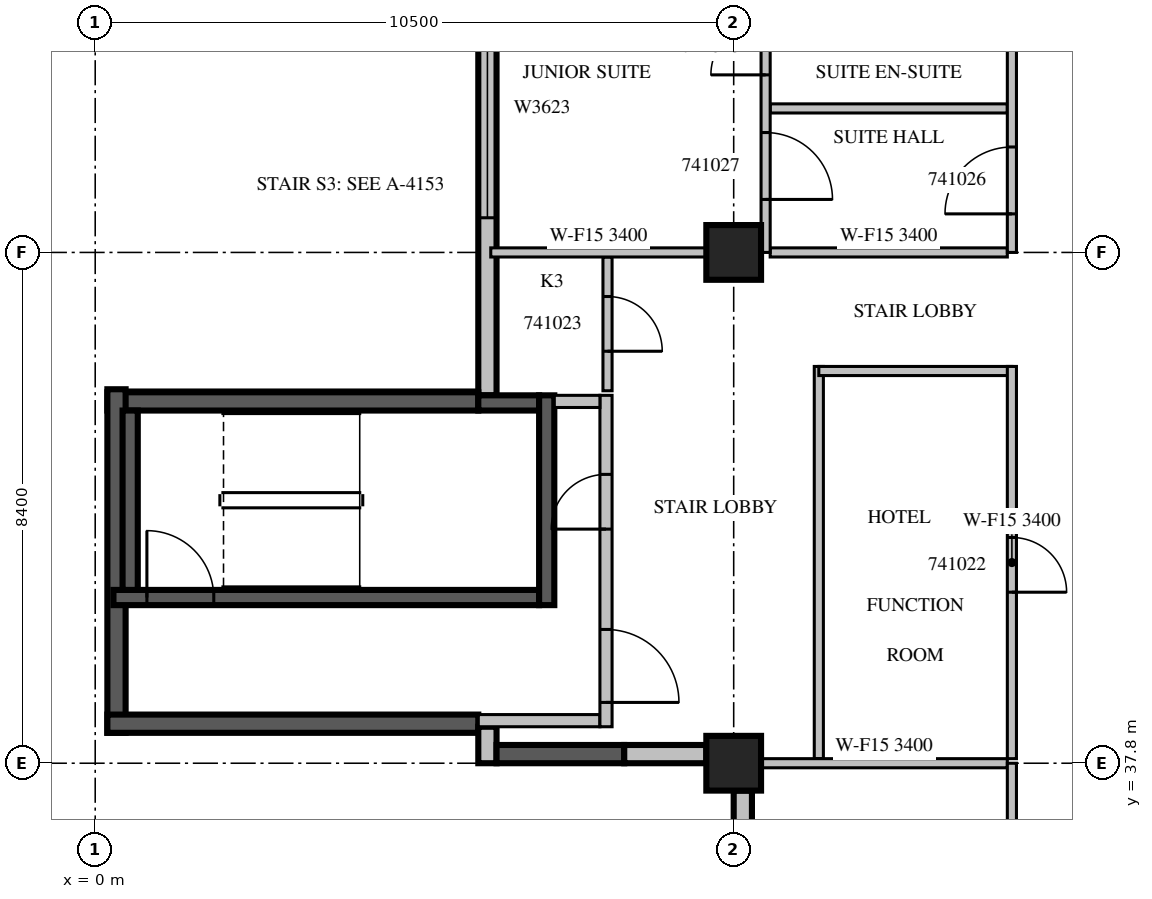
"""IFC4 building model, lengths in metres.
Left out: names, types, materials, properties, quantities, classifications, styles, units other than length and angle.
Written with IfcOpenShell. Run it as: python <this file> out.ifc"""

import sys

from ifc_helpers import new_model, si_unit, direction, frame, frame_2d, origin, origin_2d, place, context, subcontext, project, spatial, rectangle, extrude, source, transform, mapped, element, fill, save


model = new_model("IFC4")
c1 = context("Model", 3, precision=1e-05, world=origin(), true_north=direction((0.0, 1.0)))
c2 = subcontext(c1, "Body", "Model", "MODEL_VIEW")
j1 = project(units=[si_unit("LENGTHUNIT", "METRE"), si_unit("PLANEANGLEUNIT", "RADIAN")], contexts=[c1])
p1 = place(None, origin())
s1 = spatial("IfcSite", under=j1, at=p1, CompositionType="ELEMENT")
p2 = place(p1, origin())
s2 = spatial("IfcBuilding", under=s1, at=p2, CompositionType="ELEMENT")
p3 = place(p2, frame((0.0, 0.0, 189.2)))
s3 = spatial("IfcBuildingStorey", under=s2, at=p3, CompositionType="ELEMENT", Elevation=189.2)
m1 = source(origin(), c2, "Body", "SweptSolid", [
    extrude(rectangle(XDim=0.9, YDim=0.9, at=origin_2d()), origin(), (0.0, 0.0, 1.0), 3.8),
])
for number, where, z_axis, x_axis in (
    (1, (10.5, 37.8, 0.0), (0.0, 0.0, 1.0), (1.0, 0.0, 0.0)),
    (2, (10.5, 46.2, 0.0), (0.0, 0.0, 1.0), (1.0, 0.0, 0.0)),
):
    element("IfcColumn", number, at=place(p3, frame(where, z_axis=z_axis, x_axis=x_axis)), inside=s3, PredefinedType="COLUMN", context=c2, shape_type="MappedRepresentation", body=[
        mapped(m1, transform((0.0, 0.0, 0.0), scale=1.0)),
    ])
m2 = source(origin(), c2, "Body", "SweptSolid", [
    extrude(rectangle(XDim=9.91, YDim=0.3, at=frame_2d((4.955, 0.0))), origin(), (0.0, 0.0, 1.0), 3.4),
])
p4 = place(p3, frame((6.45, 53.76, 0.0), z_axis=(0.0, 0.0, 1.0), x_axis=(0.0, -1.0, 0.0)))
e3 = element("IfcWall", 3, at=p4, inside=s3, PredefinedType="STANDARD", context=c2, shape_type="MappedRepresentation", body=[
    mapped(m2, transform((0.0, 0.0, 0.0), scale=1.0)),
])
m3 = source(origin(), c2, "Body", "SweptSolid", [
    extrude(rectangle(XDim=3.6, YDim=2.3, at=frame_2d((1.8, 1.15))), frame((0.0, 0.16, 0.0), z_axis=(0.0, -1.0, 0.0), x_axis=(1.0, 0.0, 0.0)), (0.0, 0.0, 1.0), 0.32),
])
p5 = place(p4, frame((3.39, 0.0, 0.6)))
e4 = element("IfcOpeningElement", 4, at=p5, cuts=e3, PredefinedType="OPENING", context=c2, shape_type="MappedRepresentation", body=[
    mapped(m3, transform((0.0, 0.0, 0.0), scale=1.0)),
])
m4 = source(origin(), c2, "Body", "SweptSolid", [
    extrude(rectangle(XDim=2.4, YDim=2.3, at=frame_2d((1.2, 1.15))), frame((0.0, 0.16, 0.0), z_axis=(0.0, -1.0, 0.0), x_axis=(1.0, 0.0, 0.0)), (0.0, 0.0, 1.0), 0.32),
])
p6 = place(p4, frame((0.495, 0.0, 0.6)))
e5 = element("IfcOpeningElement", 5, at=p6, cuts=e3, PredefinedType="OPENING", context=c2, shape_type="MappedRepresentation", body=[
    mapped(m4, transform((0.0, 0.0, 0.0), scale=1.0)),
])
m5 = source(origin(), c2, "Body", "SweptSolid", [
    extrude(rectangle(XDim=6.1, YDim=0.3, at=frame_2d((3.05, 0.0))), origin(), (0.0, 0.0, 1.0), 3.4),
])
p7 = place(p3, frame((6.3, 43.75, 0.0), z_axis=(0.0, 0.0, 1.0), x_axis=(-1.0, 0.0, 0.0)))
e6 = element("IfcWall", 6, at=p7, inside=s3, PredefinedType="SOLIDWALL", context=c2, shape_type="MappedRepresentation", body=[
    mapped(m5, transform((0.0, 0.0, 0.0), scale=1.0)),
])
m6 = source(origin(), c2, "Body", "SweptSolid", [
    extrude(rectangle(XDim=5.65, YDim=0.3, at=frame_2d((2.825, 0.0))), origin(), (0.0, 0.0, 1.0), 3.4),
])
p8 = place(p3, frame((0.35, 43.95, 0.0), z_axis=(0.0, 0.0, 1.0), x_axis=(0.0, -1.0, 0.0)))
e7 = element("IfcWall", 7, at=p8, inside=s3, PredefinedType="SOLIDWALL", context=c2, shape_type="MappedRepresentation", body=[
    mapped(m6, transform((0.0, 0.0, 0.0), scale=1.0)),
])
p9 = place(p3, frame((0.2, 38.45, 0.0), z_axis=(0.0, 0.0, 1.0), x_axis=(1.0, 0.0, 0.0)))
e8 = element("IfcWall", 8, at=p9, inside=s3, PredefinedType="SOLIDWALL", context=c2, shape_type="MappedRepresentation", body=[
    mapped(m5, transform((0.0, 0.0, 0.0), scale=1.0)),
])
m7 = source(origin(), c2, "Body", "SweptSolid", [
    extrude(rectangle(XDim=0.6, YDim=0.3, at=frame_2d((0.3, 0.0))), origin(), (0.0, 0.0, 1.0), 3.4),
])
p10 = place(p3, frame((6.45, 38.4, 0.0), z_axis=(0.0, 0.0, 1.0), x_axis=(0.0, -1.0, 0.0)))
e9 = element("IfcWall", 9, at=p10, inside=s3, PredefinedType="STANDARD", context=c2, shape_type="MappedRepresentation", body=[
    mapped(m7, transform((0.0, 0.0, 0.0), scale=1.0)),
])
m8 = source(origin(), c2, "Body", "SweptSolid", [
    extrude(rectangle(XDim=2.1, YDim=0.3, at=frame_2d((1.05, 0.0))), origin(), (0.0, 0.0, 1.0), 3.4),
])
p11 = place(p3, frame((6.6, 37.95, 0.0), z_axis=(0.0, 0.0, 1.0), x_axis=(1.0, 0.0, 0.0)))
e10 = element("IfcWall", 10, at=p11, inside=s3, PredefinedType="SOLIDWALL", context=c2, shape_type="MappedRepresentation", body=[
    mapped(m8, transform((0.0, 0.0, 0.0), scale=1.0)),
])
m9 = source(origin(), c2, "Body", "SweptSolid", [
    extrude(rectangle(XDim=1.35, YDim=0.3, at=frame_2d((0.675, 0.0))), origin(), (0.0, 0.0, 1.0), 3.4),
])
p12 = place(p3, frame((8.7, 37.95, 0.0), z_axis=(0.0, 0.0, 1.0), x_axis=(1.0, 0.0, 0.0)))
e11 = element("IfcWall", 11, at=p12, inside=s3, PredefinedType="STANDARD", context=c2, shape_type="MappedRepresentation", body=[
    mapped(m9, transform((0.0, 0.0, 0.0), scale=1.0)),
])
m10 = source(origin(), c2, "Body", "SweptSolid", [
    extrude(rectangle(XDim=7.5, YDim=0.3, at=frame_2d((3.75, 0.0))), origin(), (0.0, 0.0, 1.0), 3.4),
])
p13 = place(p3, frame((10.65, 37.35, 0.0), z_axis=(0.0, 0.0, 1.0), x_axis=(0.0, -1.0, 0.0)))
e12 = element("IfcWall", 12, at=p13, inside=s3, PredefinedType="STANDARD", context=c2, shape_type="MappedRepresentation", body=[
    mapped(m10, transform((0.0, 0.0, 0.0), scale=1.0)),
])
m11 = source(origin(), c2, "Body", "SweptSolid", [
    extrude(rectangle(XDim=1.8, YDim=2.3, at=frame_2d((0.9, 1.15))), frame((0.0, 0.16, 0.0), z_axis=(0.0, -1.0, 0.0), x_axis=(1.0, 0.0, 0.0)), (0.0, 0.0, 1.0), 0.32),
])
p14 = place(p13, frame((4.5, 0.0, 0.6)))
e13 = element("IfcOpeningElement", 13, at=p14, cuts=e12, PredefinedType="OPENING", context=c2, shape_type="MappedRepresentation", body=[
    mapped(m11, transform((0.0, 0.0, 0.0), scale=1.0)),
])
m12 = source(origin(), c2, "Body", "SweptSolid", [
    extrude(rectangle(XDim=1.2, YDim=2.3, at=frame_2d((0.6, 1.15))), frame((0.0, 0.16, 0.0), z_axis=(0.0, -1.0, 0.0), x_axis=(1.0, 0.0, 0.0)), (0.0, 0.0, 1.0), 0.32),
])
p15 = place(p13, frame((2.071, 0.0, 0.6)))
e14 = element("IfcOpeningElement", 14, at=p15, cuts=e12, PredefinedType="OPENING", context=c2, shape_type="MappedRepresentation", body=[
    mapped(m12, transform((0.0, 0.0, 0.0), scale=1.0)),
])
m13 = source(origin(), c2, "Body", "SweptSolid", [
    extrude(rectangle(XDim=7.0, YDim=0.25, at=frame_2d((3.5, 0.0))), origin(), (0.0, 0.0, 1.0), 3.4),
])
p16 = place(p3, frame((0.3, 40.525, 0.0), z_axis=(0.0, 0.0, 1.0), x_axis=(1.0, 0.0, 0.0)))
e15 = element("IfcWall", 15, at=p16, inside=s3, PredefinedType="SOLIDWALL", context=c2, shape_type="MappedRepresentation", body=[
    mapped(m13, transform((0.0, 0.0, 0.0), scale=1.0)),
])
m14 = source(origin(), c2, "Body", "SweptSolid", [
    extrude(rectangle(XDim=1.1, YDim=2.1, at=frame_2d((0.55, 1.05))), frame((0.0, 0.135, 0.0), z_axis=(0.0, -1.0, 0.0), x_axis=(1.0, 0.0, 0.0)), (0.0, 0.0, 1.0), 0.27),
])
p17 = place(p16, frame((0.55, 0.0, 0.0)))
e16 = element("IfcOpeningElement", 16, at=p17, cuts=e15, PredefinedType="OPENING", context=c2, shape_type="MappedRepresentation", body=[
    mapped(m14, transform((0.0, 0.0, 0.0), scale=1.0)),
])
m15 = source(origin(), c2, "Body", "SweptSolid", [
    extrude(rectangle(XDim=1.0, YDim=0.25, at=frame_2d((0.5, 0.0))), origin(), (0.0, 0.0, 1.0), 3.4),
])
p18 = place(p3, frame((6.3, 43.725, 0.0), z_axis=(0.0, 0.0, 1.0), x_axis=(1.0, 0.0, 0.0)))
e17 = element("IfcWall", 17, at=p18, inside=s3, PredefinedType="SOLIDWALL", context=c2, shape_type="MappedRepresentation", body=[
    mapped(m15, transform((0.0, 0.0, 0.0), scale=1.0)),
])
m16 = source(origin(), c2, "Body", "SweptSolid", [
    extrude(rectangle(XDim=3.45, YDim=0.25, at=frame_2d((1.725, 0.0))), origin(), (0.0, 0.0, 1.0), 3.4),
])
p19 = place(p3, frame((7.425, 40.4, 0.0), z_axis=(0.0, 0.0, 1.0), x_axis=(0.0, 1.0, 0.0)))
e18 = element("IfcWall", 18, at=p19, inside=s3, PredefinedType="SOLIDWALL", context=c2, shape_type="MappedRepresentation", body=[
    mapped(m16, transform((0.0, 0.0, 0.0), scale=1.0)),
])
m17 = source(origin(), c2, "Body", "SweptSolid", [
    extrude(rectangle(XDim=2.95, YDim=0.25, at=frame_2d((1.475, 0.0))), origin(), (0.0, 0.0, 1.0), 3.4),
])
p20 = place(p3, frame((0.575, 40.65, 0.0), z_axis=(0.0, 0.0, 1.0), x_axis=(0.0, 1.0, 0.0)))
e19 = element("IfcWall", 19, at=p20, inside=s3, PredefinedType="SOLIDWALL", context=c2, shape_type="MappedRepresentation", body=[
    mapped(m17, transform((0.0, 0.0, 0.0), scale=1.0)),
])
m18 = source(origin(), c2, "Body", "SweptSolid", [
    extrude(rectangle(XDim=2.0, YDim=0.2, at=frame_2d((1.0, 0.0))), origin(), (0.0, 0.0, 1.0), 3.4),
])
p21 = place(p3, frame((6.3, 38.5, 0.0), z_axis=(0.0, 0.0, 1.0), x_axis=(1.0, 0.0, 0.0)))
e20 = element("IfcWall", 20, at=p21, inside=s3, PredefinedType="PARTITIONING", context=c2, shape_type="MappedRepresentation", body=[
    mapped(m18, transform((0.0, 0.0, 0.0), scale=1.0)),
])
m19 = source(origin(), c2, "Body", "SweptSolid", [
    extrude(rectangle(XDim=5.45, YDim=0.2, at=frame_2d((2.725, 0.0))), origin(), (0.0, 0.0, 1.0), 3.4),
])
p22 = place(p3, frame((8.4, 38.4, 0.0), z_axis=(0.0, 0.0, 1.0), x_axis=(0.0, 1.0, 0.0)))
e21 = element("IfcWall", 21, at=p22, inside=s3, PredefinedType="PARTITIONING", context=c2, shape_type="MappedRepresentation", body=[
    mapped(m19, transform((0.0, 0.0, 0.0), scale=1.0)),
])
m20 = source(origin(), c2, "Body", "SweptSolid", [
    extrude(rectangle(XDim=1.2, YDim=2.1, at=frame_2d((0.6, 1.05))), frame((0.0, 0.11, 0.0), z_axis=(0.0, -1.0, 0.0), x_axis=(1.0, 0.0, 0.0)), (0.0, 0.0, 1.0), 0.22),
])
p23 = place(p22, frame((0.4, 0.0, 0.0)))
e22 = element("IfcOpeningElement", 22, at=p23, cuts=e21, PredefinedType="OPENING", context=c2, shape_type="MappedRepresentation", body=[
    mapped(m20, transform((0.0, 0.0, 0.0), scale=1.0)),
])
m21 = source(origin(), c2, "Body", "SweptSolid", [
    extrude(rectangle(XDim=0.9, YDim=2.1, at=frame_2d((0.45, 1.05))), frame((0.0, 0.11, 0.0), z_axis=(0.0, -1.0, 0.0), x_axis=(1.0, 0.0, 0.0)), (0.0, 0.0, 1.0), 0.22),
])
p24 = place(p22, frame((3.25, 0.0, 0.0)))
e23 = element("IfcOpeningElement", 23, at=p24, cuts=e21, PredefinedType="OPENING", context=c2, shape_type="MappedRepresentation", body=[
    mapped(m21, transform((0.0, 0.0, 0.0), scale=1.0)),
])
m22 = source(origin(), c2, "Body", "SweptSolid", [
    extrude(rectangle(XDim=0.75, YDim=0.2, at=frame_2d((0.375, 0.0))), origin(), (0.0, 0.0, 1.0), 3.4),
])
p25 = place(p3, frame((7.55, 43.75, 0.0), z_axis=(0.0, 0.0, 1.0), x_axis=(1.0, 0.0, 0.0)))
e24 = element("IfcWall", 24, at=p25, inside=s3, PredefinedType="PARTITIONING", context=c2, shape_type="MappedRepresentation", body=[
    mapped(m22, transform((0.0, 0.0, 0.0), scale=1.0)),
])
m23 = source(origin(), c2, "Body", "SweptSolid", [
    extrude(rectangle(XDim=6.45, YDim=0.15, at=frame_2d((3.225, 0.0))), origin(), (0.0, 0.0, 1.0), 3.4),
])
p26 = place(p3, frame((11.9, 44.325, 0.0), z_axis=(0.0, 0.0, 1.0), x_axis=(0.0, -1.0, 0.0)))
e25 = element("IfcWall", 25, at=p26, inside=s3, PredefinedType="PARTITIONING", context=c2, shape_type="MappedRepresentation", body=[
    mapped(m23, transform((0.0, 0.0, 0.0), scale=1.0)),
])
m24 = source(origin(), c2, "Body", "SweptSolid", [
    extrude(rectangle(XDim=3.175, YDim=0.15, at=frame_2d((1.587, 0.0))), origin(), (0.0, 0.0, 1.0), 3.4),
])
p27 = place(p3, frame((15.075, 44.25, 0.0), z_axis=(0.0, 0.0, 1.0), x_axis=(-1.0, 0.0, 0.0)))
e26 = element("IfcWall", 26, at=p27, inside=s3, PredefinedType="PARTITIONING", context=c2, shape_type="MappedRepresentation", body=[
    mapped(m24, transform((0.0, 0.0, 0.0), scale=1.0)),
])
p28 = place(p3, frame((15.075, 37.875, 0.0), z_axis=(0.0, 0.0, 1.0), x_axis=(0.0, 1.0, 0.0)))
e27 = element("IfcWall", 27, at=p28, inside=s3, PredefinedType="PARTITIONING", context=c2, shape_type="MappedRepresentation", body=[
    mapped(m23, transform((0.0, 0.0, 0.0), scale=1.0)),
])
m25 = source(origin(), c2, "Body", "SweptSolid", [
    extrude(rectangle(XDim=0.9, YDim=2.1, at=frame_2d((0.45, 1.05))), frame((0.0, 0.085, 0.0), z_axis=(0.0, -1.0, 0.0), x_axis=(1.0, 0.0, 0.0)), (0.0, 0.0, 1.0), 0.17),
])
p29 = place(p28, frame((2.737, 0.0, 0.0)))
e28 = element("IfcOpeningElement", 28, at=p29, cuts=e27, PredefinedType="OPENING", context=c2, shape_type="MappedRepresentation", body=[
    mapped(m25, transform((0.0, 0.0, 0.0), scale=1.0)),
])
m26 = source(origin(), c2, "Body", "SweptSolid", [
    extrude(rectangle(XDim=2.2, YDim=0.15, at=frame_2d((1.1, 0.0))), origin(), (0.0, 0.0, 1.0), 3.4),
])
p30 = place(p3, frame((8.425, 43.925, 0.0), z_axis=(0.0, 0.0, 1.0), x_axis=(0.0, 1.0, 0.0)))
e29 = element("IfcWall", 29, at=p30, inside=s3, PredefinedType="PARTITIONING", context=c2, shape_type="MappedRepresentation", body=[
    mapped(m26, transform((0.0, 0.0, 0.0), scale=1.0)),
])
p31 = place(p30, frame((0.65, 0.0, 0.0)))
e30 = element("IfcOpeningElement", 30, at=p31, cuts=e29, PredefinedType="OPENING", context=c2, shape_type="MappedRepresentation", body=[
    mapped(m25, transform((0.0, 0.0, 0.0), scale=1.0)),
])
m27 = source(origin(), c2, "Body", "SweptSolid", [
    extrude(rectangle(XDim=4.051, YDim=0.15, at=frame_2d((2.026, 0.0))), origin(), (0.0, 0.0, 1.0), 3.4),
])
p32 = place(p3, frame((15.0, 37.8, 0.0), z_axis=(0.0, 0.0, 1.0), x_axis=(-1.0, 0.0, 0.0)))
e31 = element("IfcWall", 31, at=p32, inside=s3, PredefinedType="PARTITIONING", context=c2, shape_type="MappedRepresentation", body=[
    mapped(m27, transform((0.0, 0.0, 0.0), scale=1.0)),
])
m28 = source(origin(), c2, "Body", "SweptSolid", [
    extrude(rectangle(XDim=3.9, YDim=0.15, at=frame_2d((1.95, 0.0))), origin(), (0.0, 0.0, 1.0), 3.4),
])
p33 = place(p3, frame((15.0, 48.568, 0.0), z_axis=(0.0, 0.0, 1.0), x_axis=(-1.0, 0.0, 0.0)))
e32 = element("IfcWall", 32, at=p33, inside=s3, PredefinedType="PARTITIONING", context=c2, shape_type="MappedRepresentation", body=[
    mapped(m28, transform((0.0, 0.0, 0.0), scale=1.0)),
])
m29 = source(origin(), c2, "Body", "SweptSolid", [
    extrude(rectangle(XDim=3.546, YDim=0.15, at=frame_2d((1.773, 0.0))), origin(), (0.0, 0.0, 1.0), 3.4),
])
p34 = place(p3, frame((10.051, 46.2, 0.0), z_axis=(0.0, 0.0, 1.0), x_axis=(-1.0, 0.0, 0.0)))
e33 = element("IfcWall", 33, at=p34, inside=s3, PredefinedType="PARTITIONING", context=c2, shape_type="MappedRepresentation", body=[
    mapped(m29, transform((0.0, 0.0, 0.0), scale=1.0)),
])
p35 = place(p3, frame((15.0, 46.2, 0.0), z_axis=(0.0, 0.0, 1.0), x_axis=(-1.0, 0.0, 0.0)))
e34 = element("IfcWall", 34, at=p35, inside=s3, PredefinedType="PARTITIONING", context=c2, shape_type="MappedRepresentation", body=[
    mapped(m28, transform((0.0, 0.0, 0.0), scale=1.0)),
])
m30 = source(origin(), c2, "Body", "SweptSolid", [
    extrude(rectangle(XDim=7.26, YDim=0.15, at=frame_2d((3.63, 0.0))), origin(), (0.0, 0.0, 1.0), 3.4),
])
p36 = place(p3, frame((11.025, 46.2, 0.0), z_axis=(0.0, 0.0, 1.0), x_axis=(0.0, 1.0, 0.0)))
e35 = element("IfcWall", 35, at=p36, inside=s3, PredefinedType="PARTITIONING", context=c2, shape_type="MappedRepresentation", body=[
    mapped(m30, transform((0.0, 0.0, 0.0), scale=1.0)),
])
m31 = source(origin(), c2, "Body", "SweptSolid", [
    extrude(rectangle(XDim=1.1, YDim=2.1, at=frame_2d((0.55, 1.05))), frame((0.0, 0.085, 0.0), z_axis=(0.0, -1.0, 0.0), x_axis=(1.0, 0.0, 0.0)), (0.0, 0.0, 1.0), 0.17),
])
p37 = place(p36, frame((0.872, 0.0, 0.0)))
e36 = element("IfcOpeningElement", 36, at=p37, cuts=e35, PredefinedType="OPENING", context=c2, shape_type="MappedRepresentation", body=[
    mapped(m31, transform((0.0, 0.0, 0.0), scale=1.0)),
])
p38 = place(p36, frame((2.92, 0.0, 0.0)))
e37 = element("IfcOpeningElement", 37, at=p38, cuts=e35, PredefinedType="OPENING", context=c2, shape_type="MappedRepresentation", body=[
    mapped(m25, transform((0.0, 0.0, 0.0), scale=1.0)),
])
p39 = place(p36, frame((4.478, 0.0, 0.0)))
e38 = element("IfcOpeningElement", 38, at=p39, cuts=e35, PredefinedType="OPENING", context=c2, shape_type="MappedRepresentation", body=[
    mapped(m25, transform((0.0, 0.0, 0.0), scale=1.0)),
])
m32 = source(origin(), c2, "Body", "SweptSolid", [
    extrude(rectangle(XDim=8.4, YDim=0.15, at=frame_2d((4.2, 0.0))), origin(), (0.0, 0.0, 1.0), 3.4),
])
p40 = place(p3, frame((15.075, 29.4, 0.0), z_axis=(0.0, 0.0, 1.0), x_axis=(0.0, 1.0, 0.0)))
e39 = element("IfcWall", 39, at=p40, inside=s3, PredefinedType="PARTITIONING", context=c2, shape_type="MappedRepresentation", body=[
    mapped(m32, transform((0.0, 0.0, 0.0), scale=1.0)),
])
m33 = source(origin(), c2, "Body", "SweptSolid", [
    extrude(rectangle(XDim=1.6, YDim=2.1, at=frame_2d((0.8, 1.05))), frame((0.0, 0.085, 0.0), z_axis=(0.0, -1.0, 0.0), x_axis=(1.0, 0.0, 0.0)), (0.0, 0.0, 1.0), 0.17),
])
p41 = place(p40, frame((1.211, 0.0, 0.0)))
e40 = element("IfcOpeningElement", 40, at=p41, cuts=e39, PredefinedType="OPENING", context=c2, shape_type="MappedRepresentation", body=[
    mapped(m33, transform((0.0, 0.0, 0.0), scale=1.0)),
])
p42 = place(p40, frame((4.678, 0.0, 0.0)))
e41 = element("IfcOpeningElement", 41, at=p42, cuts=e39, PredefinedType="OPENING", context=c2, shape_type="MappedRepresentation", body=[
    mapped(m25, transform((0.0, 0.0, 0.0), scale=1.0)),
])
p43 = place(p3, frame((15.075, 46.2, 0.0), z_axis=(0.0, 0.0, 1.0), x_axis=(0.0, 1.0, 0.0)))
e42 = element("IfcWall", 42, at=p43, inside=s3, PredefinedType="PARTITIONING", context=c2, shape_type="MappedRepresentation", body=[
    mapped(m30, transform((0.0, 0.0, 0.0), scale=1.0)),
])
p44 = place(p43, frame((0.634, 0.0, 0.0)))
e43 = element("IfcOpeningElement", 43, at=p44, cuts=e42, PredefinedType="OPENING", context=c2, shape_type="MappedRepresentation", body=[
    mapped(m31, transform((0.0, 0.0, 0.0), scale=1.0)),
])
m34 = source(origin(), c2, "Body", "SweptSolid", [
    extrude(rectangle(XDim=3.6, YDim=2.3, at=frame_2d((1.8, 1.15))), frame((0.0, 0.03, 0.0), z_axis=(0.0, -1.0, 0.0), x_axis=(1.0, 0.0, 0.0)), (0.0, 0.0, 1.0), 0.06),
])
p45 = place(p5, origin())
e44 = element("IfcWindow", 44, at=p45, inside=s3, PartitioningType="SINGLE_PANEL", PredefinedType="WINDOW", context=c2, shape_type="MappedRepresentation", body=[
    mapped(m34, transform((0.0, 0.0, 0.0), scale=1.0)),
])
fill(e4, e44)
m35 = source(origin(), c2, "Body", "SweptSolid", [
    extrude(rectangle(XDim=1.1, YDim=2.1, at=frame_2d((0.55, 1.05))), frame((0.0, 0.025, 0.0), z_axis=(0.0, -1.0, 0.0), x_axis=(1.0, 0.0, 0.0)), (0.0, 0.0, 1.0), 0.05),
])
p46 = place(p17, origin())
e45 = element("IfcDoor", 45, at=p46, inside=s3, OperationType="SINGLE_SWING_LEFT", PredefinedType="DOOR", context=c2, shape_type="MappedRepresentation", body=[
    mapped(m35, transform((0.0, 0.0, 0.0), scale=1.0)),
])
fill(e16, e45)
m36 = source(origin(), c2, "Body", "SweptSolid", [
    extrude(rectangle(XDim=1.2, YDim=2.1, at=frame_2d((0.6, 1.05))), frame((0.0, 0.025, 0.0), z_axis=(0.0, -1.0, 0.0), x_axis=(1.0, 0.0, 0.0)), (0.0, 0.0, 1.0), 0.05),
])
p47 = place(p23, origin())
e46 = element("IfcDoor", 46, at=p47, inside=s3, OperationType="SINGLE_SWING_RIGHT", PredefinedType="DOOR", context=c2, shape_type="MappedRepresentation", body=[
    mapped(m36, transform((0.0, 0.0, 0.0), scale=1.0)),
])
fill(e22, e46)
m37 = source(origin(), c2, "Body", "SweptSolid", [
    extrude(rectangle(XDim=0.9, YDim=2.1, at=frame_2d((0.45, 1.05))), frame((0.0, 0.025, 0.0), z_axis=(0.0, -1.0, 0.0), x_axis=(1.0, 0.0, 0.0)), (0.0, 0.0, 1.0), 0.05),
])
p48 = place(p24, origin())
e47 = element("IfcDoor", 47, at=p48, inside=s3, OperationType="SINGLE_SWING_LEFT", PredefinedType="DOOR", context=c2, shape_type="MappedRepresentation", body=[
    mapped(m37, transform((0.0, 0.0, 0.0), scale=1.0)),
])
fill(e23, e47)
p49 = place(p29, origin())
e48 = element("IfcDoor", 48, at=p49, inside=s3, OperationType="SINGLE_SWING_RIGHT", PredefinedType="DOOR", context=c2, shape_type="MappedRepresentation", body=[
    mapped(m37, transform((0.0, 0.0, 0.0), scale=1.0)),
])
fill(e28, e48)
p50 = place(p31, origin())
e49 = element("IfcDoor", 49, at=p50, inside=s3, OperationType="SINGLE_SWING_RIGHT", PredefinedType="DOOR", context=c2, shape_type="MappedRepresentation", body=[
    mapped(m37, transform((0.0, 0.0, 0.0), scale=1.0)),
])
fill(e30, e49)
p51 = place(p44, origin())
e50 = element("IfcDoor", 50, at=p51, inside=s3, OperationType="SINGLE_SWING_LEFT", PredefinedType="DOOR", context=c2, shape_type="MappedRepresentation", body=[
    mapped(m35, transform((0.0, 0.0, 0.0), scale=1.0)),
])
fill(e43, e50)
p52 = place(p37, origin())
e51 = element("IfcDoor", 51, at=p52, inside=s3, OperationType="SINGLE_SWING_RIGHT", PredefinedType="DOOR", context=c2, shape_type="MappedRepresentation", body=[
    mapped(m35, transform((0.0, 0.0, 0.0), scale=1.0)),
])
fill(e36, e51)
p53 = place(p38, origin())
e52 = element("IfcDoor", 52, at=p53, inside=s3, OperationType="SINGLE_SWING_LEFT", PredefinedType="DOOR", context=c2, shape_type="MappedRepresentation", body=[
    mapped(m37, transform((0.0, 0.0, 0.0), scale=1.0)),
])
fill(e37, e52)
save(model, sys.argv[1])
